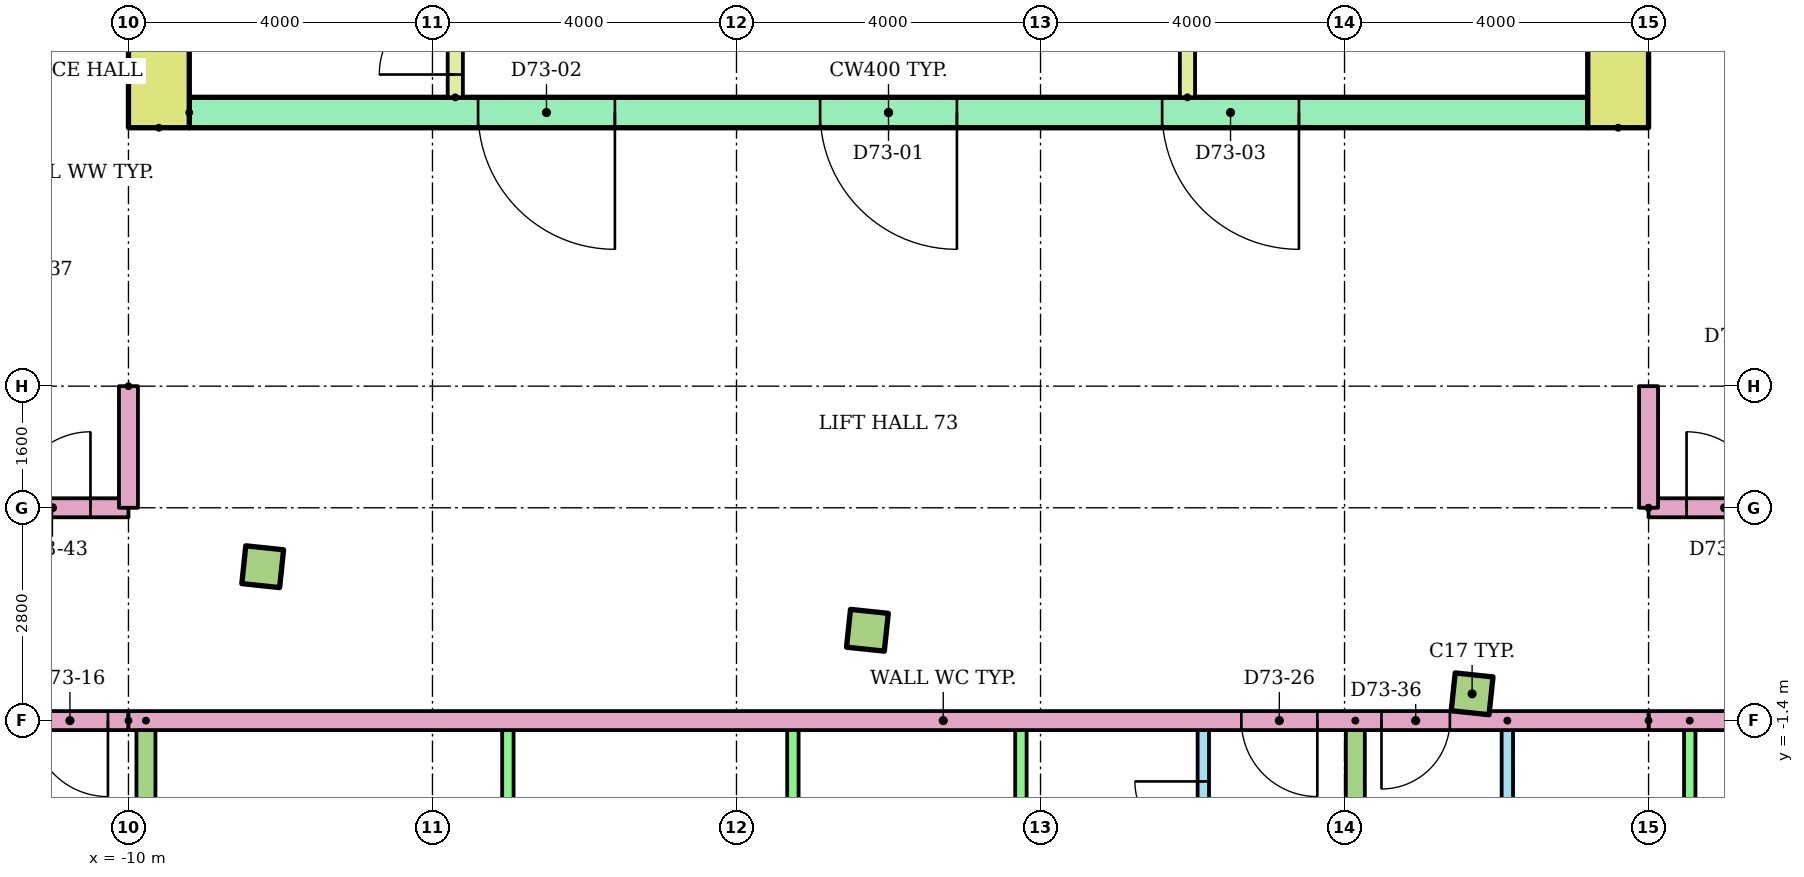
"""IFC4 building model, lengths in metres.
Left out: names, types, materials, properties, quantities, classifications, styles, units other than length and angle.
Written with IfcOpenShell. Run it as: python <this file> out.ifc"""

import sys

from ifc_helpers import new_model, si_unit, direction, frame, frame_2d, origin, origin_2d, place, context, subcontext, project, spatial, rectangle, extrude, element, fill, save


model = new_model("IFC4")
c1 = context("Model", 3, precision=1e-05, world=origin(), true_north=direction((0.0, 1.0)))
c2 = subcontext(c1, "Body", "Model", "MODEL_VIEW")
j1 = project(units=[si_unit("LENGTHUNIT", "METRE"), si_unit("PLANEANGLEUNIT", "RADIAN")], contexts=[c1])
p1 = place(None, origin())
s1 = spatial("IfcSite", under=j1, at=p1, CompositionType="ELEMENT")
p2 = place(p1, origin())
s2 = spatial("IfcBuilding", under=s1, at=p2, CompositionType="ELEMENT")
p3 = place(p2, frame((0.0, 0.0, 278.7)))
s3 = spatial("IfcBuildingStorey", under=s2, at=p3, CompositionType="ELEMENT", Elevation=278.7)
for number, where, z_axis, x_axis in (
    (1, (-8.234, 0.625, 0.0), (0.0, 0.0, 1.0), (0.995, -0.105, 0.0)),
    (2, (-0.278, -0.211, 0.0), (0.0, 0.0, 1.0), (0.995, -0.105, 0.0)),
    (3, (7.678, -1.048, 0.0), (0.0, 0.0, 1.0), (0.995, -0.105, 0.0)),
):
    element("IfcColumn", number, at=place(p3, frame(where, z_axis=z_axis, x_axis=x_axis)), inside=s3, PredefinedType="COLUMN", context=c2, shape_type="SweptSolid", body=[
        extrude(rectangle(XDim=0.5, YDim=0.5, at=origin_2d()), origin(), (0.0, 0.0, 1.0), 3.2),
    ])
for number, where, z_axis, x_axis in (
    (4, (-9.6, 6.4, 0.0), (0.0, 0.0, 1.0), (0.0, 1.0, 0.0)),
    (5, (9.6, 6.4, 0.0), (0.0, 0.0, 1.0), (0.0, 1.0, 0.0)),
):
    element("IfcWall", number, at=place(p3, frame(where, z_axis=z_axis, x_axis=x_axis)), inside=s3, PredefinedType="SHEAR", context=c2, shape_type="SweptSolid", body=[
        extrude(rectangle(XDim=13.6, YDim=0.8, at=frame_2d((6.8, 0.0))), origin(), (0.0, 0.0, 1.0), 2.8),
    ])
p4 = place(p3, frame((-9.2, 6.6, 0.0)))
e6 = element("IfcWall", 6, at=p4, inside=s3, PredefinedType="SHEAR", context=c2, shape_type="SweptSolid", body=[
    extrude(rectangle(XDim=18.4, YDim=0.4, at=frame_2d((9.2, 0.0))), origin(), (0.0, 0.0, 1.0), 2.8),
])
p5 = place(p4, frame((8.3, 0.0, 0.0)))
e7 = element("IfcOpeningElement", 7, at=p5, cuts=e6, PredefinedType="OPENING", context=c2, shape_type="SweptSolid", body=[
    extrude(rectangle(XDim=1.8, YDim=2.1, at=frame_2d((0.9, 1.05))), frame((0.0, 0.21, 0.0), z_axis=(0.0, -1.0, 0.0), x_axis=(1.0, 0.0, 0.0)), (0.0, 0.0, 1.0), 0.42),
])
p6 = place(p4, frame((3.8, 0.0, 0.0)))
e8 = element("IfcOpeningElement", 8, at=p6, cuts=e6, PredefinedType="OPENING", context=c2, shape_type="SweptSolid", body=[
    extrude(rectangle(XDim=1.8, YDim=2.1, at=frame_2d((0.9, 1.05))), frame((0.0, 0.21, 0.0), z_axis=(0.0, -1.0, 0.0), x_axis=(1.0, 0.0, 0.0)), (0.0, 0.0, 1.0), 0.42),
])
p7 = place(p4, frame((12.8, 0.0, 0.0)))
e9 = element("IfcOpeningElement", 9, at=p7, cuts=e6, PredefinedType="OPENING", context=c2, shape_type="SweptSolid", body=[
    extrude(rectangle(XDim=1.8, YDim=2.1, at=frame_2d((0.9, 1.05))), frame((0.0, 0.21, 0.0), z_axis=(0.0, -1.0, 0.0), x_axis=(1.0, 0.0, 0.0)), (0.0, 0.0, 1.0), 0.42),
])
p8 = place(p3, frame((3.933, 6.8, 0.0), z_axis=(0.0, 0.0, 1.0), x_axis=(0.0, 1.0, 0.0)))
e10 = element("IfcWall", 10, at=p8, inside=s3, PredefinedType="PARTITIONING", context=c2, shape_type="SweptSolid", body=[
    extrude(rectangle(XDim=3.3, YDim=0.2, at=frame_2d((1.65, 0.0))), origin(), (0.0, 0.0, 1.0), 2.8),
])
p9 = place(p8, frame((1.1, 0.0, 0.0)))
e11 = element("IfcOpeningElement", 11, at=p9, cuts=e10, PredefinedType="OPENING", context=c2, shape_type="SweptSolid", body=[
    extrude(rectangle(XDim=1.1, YDim=2.1, at=frame_2d((0.55, 1.05))), frame((0.0, 0.11, 0.0), z_axis=(0.0, -1.0, 0.0), x_axis=(1.0, 0.0, 0.0)), (0.0, 0.0, 1.0), 0.22),
])
p10 = place(p3, frame((-5.7, 6.8, 0.0), z_axis=(0.0, 0.0, 1.0), x_axis=(0.0, 1.0, 0.0)))
e12 = element("IfcWall", 12, at=p10, inside=s3, PredefinedType="PARTITIONING", context=c2, shape_type="SweptSolid", body=[
    extrude(rectangle(XDim=1.6, YDim=0.2, at=frame_2d((0.8, 0.0))), origin(), (0.0, 0.0, 1.0), 2.8),
])
p11 = place(p10, frame((0.3, 0.0, 0.0)))
e13 = element("IfcOpeningElement", 13, at=p11, cuts=e12, PredefinedType="OPENING", context=c2, shape_type="SweptSolid", body=[
    extrude(rectangle(XDim=1.0, YDim=2.1, at=frame_2d((0.5, 1.05))), frame((0.0, 0.11, 0.0), z_axis=(0.0, -1.0, 0.0), x_axis=(1.0, 0.0, 0.0)), (0.0, 0.0, 1.0), 0.22),
])
p12 = place(p3, frame((4.142, -5.9, 0.0), z_axis=(0.0, 0.0, 1.0), x_axis=(0.0, 1.0, 0.0)))
e14 = element("IfcWall", 14, at=p12, inside=s3, PredefinedType="PARTITIONING", context=c2, shape_type="SweptSolid", body=[
    extrude(rectangle(XDim=4.5, YDim=0.15, at=frame_2d((2.25, 0.0))), origin(), (0.0, 0.0, 1.0), 2.4),
])
p13 = place(p12, frame((2.8, 0.0, 0.0)))
e15 = element("IfcOpeningElement", 15, at=p13, cuts=e14, PredefinedType="OPENING", context=c2, shape_type="SweptSolid", body=[
    extrude(rectangle(XDim=0.9, YDim=2.1, at=frame_2d((0.45, 1.05))), frame((0.0, 0.085, 0.0), z_axis=(0.0, -1.0, 0.0), x_axis=(1.0, 0.0, 0.0)), (0.0, 0.0, 1.0), 0.17),
])
p14 = place(p12, frame((0.6, 0.0, 0.0)))
e16 = element("IfcOpeningElement", 16, at=p14, cuts=e14, PredefinedType="OPENING", context=c2, shape_type="SweptSolid", body=[
    extrude(rectangle(XDim=0.8, YDim=2.1, at=frame_2d((0.4, 1.05))), frame((0.0, 0.085, 0.0), z_axis=(0.0, -1.0, 0.0), x_axis=(1.0, 0.0, 0.0)), (0.0, 0.0, 1.0), 0.17),
])
for number, where, z_axis, x_axis in (
    (17, (1.742, -5.9, 0.0), (0.0, 0.0, 1.0), (0.0, 1.0, 0.0)),
    (18, (-1.258, -5.9, 0.0), (0.0, 0.0, 1.0), (0.0, 1.0, 0.0)),
    (19, (-5.008, -5.9, 0.0), (0.0, 0.0, 1.0), (0.0, 1.0, 0.0)),
):
    element("IfcWall", number, at=place(p3, frame(where, z_axis=z_axis, x_axis=x_axis)), inside=s3, PredefinedType="PARTITIONING", context=c2, shape_type="SweptSolid", body=[
        extrude(rectangle(XDim=4.5, YDim=0.15, at=frame_2d((2.25, 0.0))), origin(), (0.0, 0.0, 1.0), 2.4),
    ])
p15 = place(p3, frame((-9.77, -1.4, 0.0), z_axis=(0.0, 0.0, 1.0), x_axis=(0.0, -1.0, 0.0)))
e20 = element("IfcWall", 20, at=p15, inside=s3, PredefinedType="PARTITIONING", context=c2, shape_type="SweptSolid", body=[
    extrude(rectangle(XDim=12.504, YDim=0.25, at=frame_2d((6.252, 0.0))), origin(), (0.0, 0.0, 1.0), 2.4),
])
p16 = place(p3, frame((8.142, -1.4, 0.0), z_axis=(0.0, 0.0, 1.0), x_axis=(0.0, -1.0, 0.0)))
e21 = element("IfcWall", 21, at=p16, inside=s3, PredefinedType="PARTITIONING", context=c2, shape_type="SweptSolid", body=[
    extrude(rectangle(XDim=6.582, YDim=0.15, at=frame_2d((3.291, 0.0))), origin(), (0.0, 0.0, 1.0), 2.4),
])
p17 = place(p16, frame((1.3, 0.0, 0.0)))
e22 = element("IfcOpeningElement", 22, at=p17, cuts=e21, PredefinedType="OPENING", context=c2, shape_type="SweptSolid", body=[
    extrude(rectangle(XDim=0.9, YDim=2.1, at=frame_2d((0.45, 1.05))), frame((0.0, 0.085, 0.0), z_axis=(0.0, -1.0, 0.0), x_axis=(1.0, 0.0, 0.0)), (0.0, 0.0, 1.0), 0.17),
])
p18 = place(p16, frame((4.641, 0.0, 0.0)))
e23 = element("IfcOpeningElement", 23, at=p18, cuts=e21, PredefinedType="OPENING", context=c2, shape_type="SweptSolid", body=[
    extrude(rectangle(XDim=0.8, YDim=2.1, at=frame_2d((0.4, 1.05))), frame((0.0, 0.085, 0.0), z_axis=(0.0, -1.0, 0.0), x_axis=(1.0, 0.0, 0.0)), (0.0, 0.0, 1.0), 0.17),
])
p19 = place(p3, frame((10.542, -1.4, 0.0), z_axis=(0.0, 0.0, 1.0), x_axis=(0.0, -1.0, 0.0)))
e24 = element("IfcWall", 24, at=p19, inside=s3, PredefinedType="PARTITIONING", context=c2, shape_type="SweptSolid", body=[
    extrude(rectangle(XDim=6.582, YDim=0.15, at=frame_2d((3.291, 0.0))), origin(), (0.0, 0.0, 1.0), 2.4),
])
p20 = place(p3, frame((6.142, -1.4, 0.0), z_axis=(0.0, 0.0, 1.0), x_axis=(0.0, -1.0, 0.0)))
e25 = element("IfcWall", 25, at=p20, inside=s3, PredefinedType="PARTITIONING", context=c2, shape_type="SweptSolid", body=[
    extrude(rectangle(XDim=14.177, YDim=0.25, at=frame_2d((7.088, 0.0))), origin(), (0.0, 0.0, 1.0), 2.4),
])
p21 = place(p3, frame((-10.0, -1.4, 0.0), z_axis=(0.0, 0.0, 1.0), x_axis=(-1.0, 0.0, 0.0)))
e26 = element("IfcWall", 26, at=p21, inside=s3, PredefinedType="PARTITIONING", context=c2, shape_type="SweptSolid", body=[
    extrude(rectangle(XDim=13.56, YDim=0.25, at=frame_2d((6.78, 0.0))), origin(), (0.0, 0.0, 1.0), 2.4),
])
p22 = place(p21, frame((0.27, 0.0, 0.0)))
e27 = element("IfcOpeningElement", 27, at=p22, cuts=e26, PredefinedType="OPENING", context=c2, shape_type="SweptSolid", body=[
    extrude(rectangle(XDim=1.0, YDim=2.1, at=frame_2d((0.5, 1.05))), frame((0.0, 0.135, 0.0), z_axis=(0.0, -1.0, 0.0), x_axis=(1.0, 0.0, 0.0)), (0.0, 0.0, 1.0), 0.27),
])
p23 = place(p3, frame((25.0, -1.4, 0.0), z_axis=(0.0, 0.0, 1.0), x_axis=(-1.0, 0.0, 0.0)))
e28 = element("IfcWall", 28, at=p23, inside=s3, PredefinedType="PARTITIONING", context=c2, shape_type="SweptSolid", body=[
    extrude(rectangle(XDim=15.0, YDim=0.25, at=frame_2d((7.5, 0.0))), origin(), (0.0, 0.0, 1.0), 2.4),
])
p24 = place(p3, frame((-23.265, 1.4, 0.0)))
e29 = element("IfcWall", 29, at=p24, inside=s3, PredefinedType="PARTITIONING", context=c2, shape_type="SweptSolid", body=[
    extrude(rectangle(XDim=13.265, YDim=0.25, at=frame_2d((6.633, 0.0))), origin(), (0.0, 0.0, 1.0), 2.4),
])
p25 = place(p24, frame((11.765, 0.0, 0.0)))
e30 = element("IfcOpeningElement", 30, at=p25, cuts=e29, PredefinedType="OPENING", context=c2, shape_type="SweptSolid", body=[
    extrude(rectangle(XDim=1.0, YDim=2.1, at=frame_2d((0.5, 1.05))), frame((0.0, 0.135, 0.0), z_axis=(0.0, -1.0, 0.0), x_axis=(1.0, 0.0, 0.0)), (0.0, 0.0, 1.0), 0.27),
])
p26 = place(p3, frame((10.0, 1.4, 0.0)))
e31 = element("IfcWall", 31, at=p26, inside=s3, PredefinedType="PARTITIONING", context=c2, shape_type="SweptSolid", body=[
    extrude(rectangle(XDim=15.0, YDim=0.25, at=frame_2d((7.5, 0.0))), origin(), (0.0, 0.0, 1.0), 2.4),
])
p27 = place(p26, frame((0.5, 0.0, 0.0)))
e32 = element("IfcOpeningElement", 32, at=p27, cuts=e31, PredefinedType="OPENING", context=c2, shape_type="SweptSolid", body=[
    extrude(rectangle(XDim=1.0, YDim=2.1, at=frame_2d((0.5, 1.05))), frame((0.0, 0.135, 0.0), z_axis=(0.0, -1.0, 0.0), x_axis=(1.0, 0.0, 0.0)), (0.0, 0.0, 1.0), 0.27),
])
p28 = place(p3, frame((10.0, -1.4, 0.0), z_axis=(0.0, 0.0, 1.0), x_axis=(-1.0, 0.0, 0.0)))
e33 = element("IfcWall", 33, at=p28, inside=s3, PredefinedType="PARTITIONING", context=c2, shape_type="SweptSolid", body=[
    extrude(rectangle(XDim=20.0, YDim=0.25, at=frame_2d((10.0, 0.0))), origin(), (0.0, 0.0, 1.0), 2.4),
])
p29 = place(p28, frame((4.358, 0.0, 0.0)))
e34 = element("IfcOpeningElement", 34, at=p29, cuts=e33, PredefinedType="OPENING", context=c2, shape_type="SweptSolid", body=[
    extrude(rectangle(XDim=1.0, YDim=2.1, at=frame_2d((0.5, 1.05))), frame((0.0, 0.135, 0.0), z_axis=(0.0, -1.0, 0.0), x_axis=(1.0, 0.0, 0.0)), (0.0, 0.0, 1.0), 0.27),
])
p30 = place(p28, frame((2.614, 0.0, 0.0)))
e35 = element("IfcOpeningElement", 35, at=p30, cuts=e33, PredefinedType="OPENING", context=c2, shape_type="SweptSolid", body=[
    extrude(rectangle(XDim=0.9, YDim=2.1, at=frame_2d((0.45, 1.05))), frame((0.0, 0.135, 0.0), z_axis=(0.0, -1.0, 0.0), x_axis=(1.0, 0.0, 0.0)), (0.0, 0.0, 1.0), 0.27),
])
for number, where, z_axis, x_axis in (
    (36, (-10.0, 3.0, 0.0), (0.0, 0.0, 1.0), (0.0, -1.0, 0.0)),
    (37, (10.0, 1.4, 0.0), (0.0, 0.0, 1.0), (0.0, 1.0, 0.0)),
):
    element("IfcWall", number, at=place(p3, frame(where, z_axis=z_axis, x_axis=x_axis)), inside=s3, PredefinedType="PARTITIONING", context=c2, shape_type="SweptSolid", body=[
        extrude(rectangle(XDim=1.6, YDim=0.25, at=frame_2d((0.8, 0.0))), origin(), (0.0, 0.0, 1.0), 2.4),
    ])
p31 = place(p5, frame((1.8, 0.0, 0.0), z_axis=(0.0, 0.0, 1.0), x_axis=(-1.0, 0.0, 0.0)))
e38 = element("IfcDoor", 38, at=p31, inside=s3, OperationType="DOUBLE_DOOR_SINGLE_SWING", PredefinedType="DOOR", context=c2, shape_type="SweptSolid", body=[
    extrude(rectangle(XDim=1.8, YDim=2.1, at=frame_2d((0.9, 1.05))), frame((0.0, 0.025, 0.0), z_axis=(0.0, -1.0, 0.0), x_axis=(1.0, 0.0, 0.0)), (0.0, 0.0, 1.0), 0.05),
])
fill(e7, e38)
p32 = place(p6, frame((1.8, 0.0, 0.0), z_axis=(0.0, 0.0, 1.0), x_axis=(-1.0, 0.0, 0.0)))
e39 = element("IfcDoor", 39, at=p32, inside=s3, OperationType="DOUBLE_DOOR_SINGLE_SWING", PredefinedType="DOOR", context=c2, shape_type="SweptSolid", body=[
    extrude(rectangle(XDim=1.8, YDim=2.1, at=frame_2d((0.9, 1.05))), frame((0.0, 0.025, 0.0), z_axis=(0.0, -1.0, 0.0), x_axis=(1.0, 0.0, 0.0)), (0.0, 0.0, 1.0), 0.05),
])
fill(e8, e39)
p33 = place(p7, frame((1.8, 0.0, 0.0), z_axis=(0.0, 0.0, 1.0), x_axis=(-1.0, 0.0, 0.0)))
e40 = element("IfcDoor", 40, at=p33, inside=s3, OperationType="DOUBLE_DOOR_SINGLE_SWING", PredefinedType="DOOR", context=c2, shape_type="SweptSolid", body=[
    extrude(rectangle(XDim=1.8, YDim=2.1, at=frame_2d((0.9, 1.05))), frame((0.0, 0.025, 0.0), z_axis=(0.0, -1.0, 0.0), x_axis=(1.0, 0.0, 0.0)), (0.0, 0.0, 1.0), 0.05),
])
fill(e9, e40)
p34 = place(p11, origin())
e41 = element("IfcDoor", 41, at=p34, inside=s3, OperationType="SINGLE_SWING_LEFT", PredefinedType="DOOR", context=c2, shape_type="SweptSolid", body=[
    extrude(rectangle(XDim=1.0, YDim=2.1, at=frame_2d((0.5, 1.05))), frame((0.0, 0.025, 0.0), z_axis=(0.0, -1.0, 0.0), x_axis=(1.0, 0.0, 0.0)), (0.0, 0.0, 1.0), 0.05),
])
fill(e13, e41)
p35 = place(p22, origin())
e42 = element("IfcDoor", 42, at=p35, inside=s3, OperationType="SINGLE_SWING_LEFT", PredefinedType="DOOR", context=c2, shape_type="SweptSolid", body=[
    extrude(rectangle(XDim=1.0, YDim=2.1, at=frame_2d((0.5, 1.05))), frame((0.0, 0.025, 0.0), z_axis=(0.0, -1.0, 0.0), x_axis=(1.0, 0.0, 0.0)), (0.0, 0.0, 1.0), 0.05),
])
fill(e27, e42)
p36 = place(p13, origin())
e43 = element("IfcDoor", 43, at=p36, inside=s3, OperationType="SINGLE_SWING_RIGHT", PredefinedType="DOOR", context=c2, shape_type="SweptSolid", body=[
    extrude(rectangle(XDim=0.9, YDim=2.1, at=frame_2d((0.45, 1.05))), frame((0.0, 0.025, 0.0), z_axis=(0.0, -1.0, 0.0), x_axis=(1.0, 0.0, 0.0)), (0.0, 0.0, 1.0), 0.05),
])
fill(e15, e43)
p37 = place(p29, origin())
e44 = element("IfcDoor", 44, at=p37, inside=s3, OperationType="SINGLE_SWING_LEFT", PredefinedType="DOOR", context=c2, shape_type="SweptSolid", body=[
    extrude(rectangle(XDim=1.0, YDim=2.1, at=frame_2d((0.5, 1.05))), frame((0.0, 0.025, 0.0), z_axis=(0.0, -1.0, 0.0), x_axis=(1.0, 0.0, 0.0)), (0.0, 0.0, 1.0), 0.05),
])
fill(e34, e44)
p38 = place(p30, origin())
e45 = element("IfcDoor", 45, at=p38, inside=s3, OperationType="SINGLE_SWING_RIGHT", PredefinedType="DOOR", context=c2, shape_type="SweptSolid", body=[
    extrude(rectangle(XDim=0.9, YDim=2.1, at=frame_2d((0.45, 1.05))), frame((0.0, 0.025, 0.0), z_axis=(0.0, -1.0, 0.0), x_axis=(1.0, 0.0, 0.0)), (0.0, 0.0, 1.0), 0.05),
])
fill(e35, e45)
p39 = place(p25, origin())
e46 = element("IfcDoor", 46, at=p39, inside=s3, OperationType="SINGLE_SWING_RIGHT", PredefinedType="DOOR", context=c2, shape_type="SweptSolid", body=[
    extrude(rectangle(XDim=1.0, YDim=2.1, at=frame_2d((0.5, 1.05))), frame((0.0, 0.025, 0.0), z_axis=(0.0, -1.0, 0.0), x_axis=(1.0, 0.0, 0.0)), (0.0, 0.0, 1.0), 0.05),
])
fill(e30, e46)
p40 = place(p27, origin())
e47 = element("IfcDoor", 47, at=p40, inside=s3, OperationType="SINGLE_SWING_LEFT", PredefinedType="DOOR", context=c2, shape_type="SweptSolid", body=[
    extrude(rectangle(XDim=1.0, YDim=2.1, at=frame_2d((0.5, 1.05))), frame((0.0, 0.025, 0.0), z_axis=(0.0, -1.0, 0.0), x_axis=(1.0, 0.0, 0.0)), (0.0, 0.0, 1.0), 0.05),
])
fill(e32, e47)
save(model, sys.argv[1])
